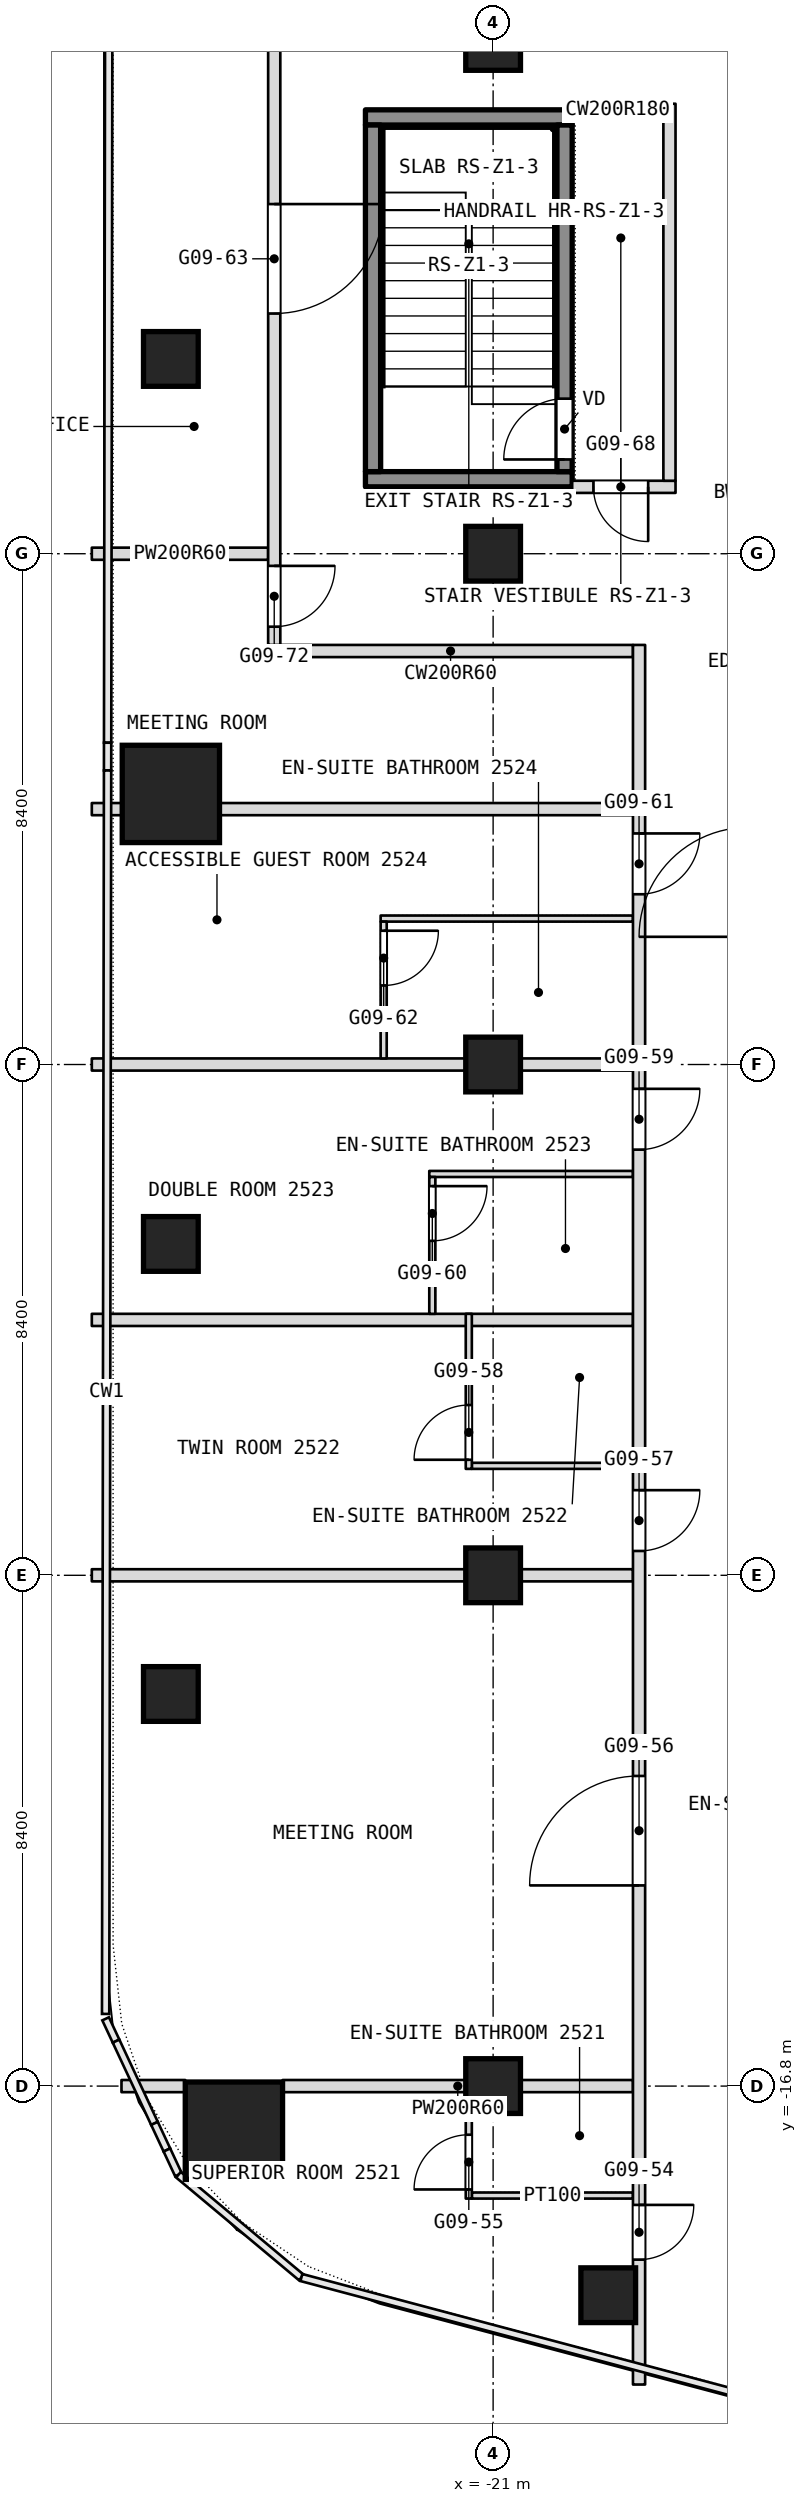
"""IFC4 building model, lengths in metres.
Left out: names, types, materials, properties, quantities, classifications, styles, units other than length and angle.
Written with IfcOpenShell. Run it as: python <this file> out.ifc"""

import sys

from ifc_helpers import new_model, si_unit, direction, frame, frame_2d, origin, origin_2d, place, context, subcontext, project, spatial, rectangle, extrude, element, fill, save


model = new_model("IFC4")
c1 = context("Model", 3, precision=1e-05, world=origin(), true_north=direction((0.0, 1.0)))
c2 = subcontext(c1, "Body", "Model", "MODEL_VIEW")
j1 = project(units=[si_unit("LENGTHUNIT", "METRE"), si_unit("PLANEANGLEUNIT", "RADIAN")], contexts=[c1])
p1 = place(None, origin())
s1 = spatial("IfcSite", under=j1, at=p1, CompositionType="ELEMENT")
p2 = place(p1, origin())
s2 = spatial("IfcBuilding", under=s1, at=p2, CompositionType="ELEMENT")
p3 = place(p2, frame((0.0, 0.0, 115.7)))
s3 = spatial("IfcBuildingStorey", under=s2, at=p3, CompositionType="ELEMENT", Elevation=115.7)
for number, where, z_axis, x_axis in (
    (1, (-25.263, -17.533, 0.0), (0.0, 0.0, 1.0), (1.0, 0.0, 0.0)),
    (2, (-26.3, 4.45, 0.0), (0.0, 0.0, 1.0), (1.0, 0.0, 0.0)),
):
    element("IfcColumn", number, at=place(p3, frame(where, z_axis=z_axis, x_axis=x_axis)), inside=s3, PredefinedType="COLUMN", context=c2, shape_type="SweptSolid", body=[
        extrude(rectangle(XDim=1.6, YDim=1.6, at=origin_2d()), origin(), (0.0, 0.0, 1.0), 3.6),
    ])
for number, where, z_axis, x_axis in (
    (3, (-21.0, -16.8, 0.0), (0.0, 0.0, 1.0), (1.0, 0.0, 0.0)),
    (4, (-21.0, -8.4, 0.0), (0.0, 0.0, 1.0), (1.0, 0.0, 0.0)),
    (5, (-21.0, 0.0, 0.0), (0.0, 0.0, 1.0), (1.0, 0.0, 0.0)),
    (6, (-21.0, 8.4, 0.0), (0.0, 0.0, 1.0), (1.0, 0.0, 0.0)),
    (7, (-21.0, 16.8, 0.0), (0.0, 0.0, 1.0), (1.0, 0.0, 0.0)),
    (8, (-26.3, -10.352, 0.0), (0.0, 0.0, 1.0), (1.0, 0.0, 0.0)),
    (9, (-26.3, -2.951, 0.0), (0.0, 0.0, 1.0), (1.0, 0.0, 0.0)),
    (10, (-26.3, 11.603, 0.0), (0.0, 0.0, 1.0), (1.0, 0.0, 0.0)),
    (11, (-19.107, -20.239, 0.0), (0.0, 0.0, 1.0), (1.0, 0.0, 0.0)),
):
    element("IfcColumn", number, at=place(p3, frame(where, z_axis=z_axis, x_axis=x_axis)), inside=s3, PredefinedType="COLUMN", context=c2, shape_type="SweptSolid", body=[
        extrude(rectangle(XDim=0.9, YDim=0.9, at=origin_2d()), origin(), (0.0, 0.0, 1.0), 3.6),
    ])
p4 = place(p3, frame((-21.35, -18.6, 0.0), z_axis=(0.0, 0.0, 1.0), x_axis=(1.0, 0.0, 0.0)))
e12 = element("IfcWall", 12, at=p4, inside=s3, PredefinedType="PARTITIONING", context=c2, shape_type="SweptSolid", body=[
    extrude(rectangle(XDim=2.65, YDim=0.1, at=frame_2d((1.325, 0.0))), origin(), (0.0, 0.0, 1.0), 3.34),
])
p5 = place(p3, frame((-27.112, -16.8, 0.0), z_axis=(0.0, 0.0, 1.0), x_axis=(1.0, 0.0, 0.0)))
e13 = element("IfcWall", 13, at=p5, inside=s3, PredefinedType="PARTITIONING", context=c2, shape_type="SweptSolid", body=[
    extrude(rectangle(XDim=1.049, YDim=0.2, at=frame_2d((0.524, 0.0))), origin(), (0.0, 0.0, 1.0), 3.34),
])
p6 = place(p3, frame((-24.463, -16.8, 0.0), z_axis=(0.0, 0.0, 1.0), x_axis=(1.0, 0.0, 0.0)))
e14 = element("IfcWall", 14, at=p6, inside=s3, PredefinedType="PARTITIONING", context=c2, shape_type="SweptSolid", body=[
    extrude(rectangle(XDim=5.763, YDim=0.2, at=frame_2d((2.881, 0.0))), origin(), (0.0, 0.0, 1.0), 2.89),
])
p7 = place(p3, frame((-27.6, -8.4, 0.0), z_axis=(0.0, 0.0, 1.0), x_axis=(1.0, 0.0, 0.0)))
e15 = element("IfcWall", 15, at=p7, inside=s3, PredefinedType="PARTITIONING", context=c2, shape_type="SweptSolid", body=[
    extrude(rectangle(XDim=8.9, YDim=0.2, at=frame_2d((4.45, 0.0))), origin(), (0.0, 0.0, 1.0), 2.89),
])
p8 = place(p3, frame((-21.35, -6.6, 0.0), z_axis=(0.0, 0.0, 1.0), x_axis=(1.0, 0.0, 0.0)))
e16 = element("IfcWall", 16, at=p8, inside=s3, PredefinedType="PARTITIONING", context=c2, shape_type="SweptSolid", body=[
    extrude(rectangle(XDim=2.65, YDim=0.1, at=frame_2d((1.325, 0.0))), origin(), (0.0, 0.0, 1.0), 3.34),
])
p9 = place(p3, frame((-27.6, -4.2, 0.0), z_axis=(0.0, 0.0, 1.0), x_axis=(1.0, 0.0, 0.0)))
e17 = element("IfcWall", 17, at=p9, inside=s3, PredefinedType="PARTITIONING", context=c2, shape_type="SweptSolid", body=[
    extrude(rectangle(XDim=8.9, YDim=0.2, at=frame_2d((4.45, 0.0))), origin(), (0.0, 0.0, 1.0), 3.34),
])
p10 = place(p3, frame((-22.05, -1.8, 0.0), z_axis=(0.0, 0.0, 1.0), x_axis=(1.0, 0.0, 0.0)))
e18 = element("IfcWall", 18, at=p10, inside=s3, PredefinedType="PARTITIONING", context=c2, shape_type="SweptSolid", body=[
    extrude(rectangle(XDim=3.35, YDim=0.1, at=frame_2d((1.675, 0.0))), origin(), (0.0, 0.0, 1.0), 3.34),
])
p11 = place(p3, frame((-27.6, 0.0, 0.0), z_axis=(0.0, 0.0, 1.0), x_axis=(1.0, 0.0, 0.0)))
e19 = element("IfcWall", 19, at=p11, inside=s3, PredefinedType="PARTITIONING", context=c2, shape_type="SweptSolid", body=[
    extrude(rectangle(XDim=8.9, YDim=0.2, at=frame_2d((4.45, 0.0))), origin(), (0.0, 0.0, 1.0), 2.89),
])
p12 = place(p3, frame((-22.85, 2.4, 0.0), z_axis=(0.0, 0.0, 1.0), x_axis=(1.0, 0.0, 0.0)))
e20 = element("IfcWall", 20, at=p12, inside=s3, PredefinedType="PARTITIONING", context=c2, shape_type="SweptSolid", body=[
    extrude(rectangle(XDim=4.15, YDim=0.1, at=frame_2d((2.075, 0.0))), origin(), (0.0, 0.0, 1.0), 3.34),
])
p13 = place(p3, frame((-27.6, 4.2, 0.0), z_axis=(0.0, 0.0, 1.0), x_axis=(1.0, 0.0, 0.0)))
e21 = element("IfcWall", 21, at=p13, inside=s3, PredefinedType="PARTITIONING", context=c2, shape_type="SweptSolid", body=[
    extrude(rectangle(XDim=0.5, YDim=0.2, at=frame_2d((0.25, 0.0))), origin(), (0.0, 0.0, 1.0), 3.34),
])
p14 = place(p3, frame((-25.5, 4.2, 0.0), z_axis=(0.0, 0.0, 1.0), x_axis=(1.0, 0.0, 0.0)))
e22 = element("IfcWall", 22, at=p14, inside=s3, PredefinedType="PARTITIONING", context=c2, shape_type="SweptSolid", body=[
    extrude(rectangle(XDim=6.8, YDim=0.2, at=frame_2d((3.4, 0.0))), origin(), (0.0, 0.0, 1.0), 3.34),
])
p15 = place(p3, frame((-24.7, 6.8, 0.0), z_axis=(0.0, 0.0, 1.0), x_axis=(1.0, 0.0, 0.0)))
e23 = element("IfcWall", 23, at=p15, inside=s3, PredefinedType="PARTITIONING", context=c2, shape_type="SweptSolid", body=[
    extrude(rectangle(XDim=6.0, YDim=0.2, at=frame_2d((3.0, 0.0))), origin(), (0.0, 0.0, 1.0), 3.34),
])
p16 = place(p3, frame((-27.6, 8.4, 0.0), z_axis=(0.0, 0.0, 1.0), x_axis=(1.0, 0.0, 0.0)))
e24 = element("IfcWall", 24, at=p16, inside=s3, PredefinedType="PARTITIONING", context=c2, shape_type="SweptSolid", body=[
    extrude(rectangle(XDim=2.9, YDim=0.2, at=frame_2d((1.45, 0.0))), origin(), (0.0, 0.0, 1.0), 2.89),
])
p17 = place(p3, frame((-19.7, 9.5, 0.0), z_axis=(0.0, 0.0, 1.0), x_axis=(1.0, 0.0, 0.0)))
e25 = element("IfcWall", 25, at=p17, inside=s3, PredefinedType="PARTITIONING", context=c2, shape_type="SweptSolid", body=[
    extrude(rectangle(XDim=1.7, YDim=0.2, at=frame_2d((0.85, 0.0))), origin(), (0.0, 0.0, 1.0), 3.34),
])
p18 = place(p17, frame((0.35, 0.0, 0.0)))
e26 = element("IfcOpeningElement", 26, at=p18, cuts=e25, PredefinedType="OPENING", context=c2, shape_type="SweptSolid", body=[
    extrude(rectangle(XDim=0.9, YDim=2.1, at=frame_2d((0.45, 1.05))), frame((0.0, 0.1, 0.0), z_axis=(0.0, -1.0, 0.0), x_axis=(1.0, 0.0, 0.0)), (0.0, 0.0, 1.0), 0.2),
])
p19 = place(p3, frame((-19.7, 15.7, 0.0), z_axis=(0.0, 0.0, 1.0), x_axis=(1.0, 0.0, 0.0)))
e27 = element("IfcWall", 27, at=p19, inside=s3, PredefinedType="PARTITIONING", context=c2, shape_type="SweptSolid", body=[
    extrude(rectangle(XDim=1.5, YDim=0.2, at=frame_2d((0.75, 0.0))), origin(), (0.0, 0.0, 1.0), 3.34),
])
p20 = place(p3, frame((-18.1, 9.6, 0.0), z_axis=(0.0, 0.0, 1.0), x_axis=(0.0, 1.0, 0.0)))
e28 = element("IfcWall", 28, at=p20, inside=s3, PredefinedType="PARTITIONING", context=c2, shape_type="SweptSolid", body=[
    extrude(rectangle(XDim=6.2, YDim=0.2, at=frame_2d((3.1, 0.0))), origin(), (0.0, 0.0, 1.0), 3.34),
])
p21 = place(p3, frame((-18.6, -21.708, 0.0), z_axis=(0.0, 0.0, 1.0), x_axis=(0.0, 1.0, 0.0)))
e29 = element("IfcWall", 29, at=p21, inside=s3, PredefinedType="PARTITIONING", context=c2, shape_type="SweptSolid", body=[
    extrude(rectangle(XDim=28.608, YDim=0.2, at=frame_2d((14.304, 0.0))), origin(), (0.0, 0.0, 1.0), 3.34),
])
p22 = place(p21, frame((2.054, 0.0, 0.0)))
e30 = element("IfcOpeningElement", 30, at=p22, cuts=e29, PredefinedType="OPENING", context=c2, shape_type="SweptSolid", body=[
    extrude(rectangle(XDim=0.9, YDim=2.1, at=frame_2d((0.45, 1.05))), frame((0.0, 0.1, 0.0), z_axis=(0.0, -1.0, 0.0), x_axis=(1.0, 0.0, 0.0)), (0.0, 0.0, 1.0), 0.2),
])
p23 = place(p21, frame((8.208, 0.0, 0.0)))
e31 = element("IfcOpeningElement", 31, at=p23, cuts=e29, PredefinedType="OPENING", context=c2, shape_type="SweptSolid", body=[
    extrude(rectangle(XDim=1.8, YDim=2.1, at=frame_2d((0.9, 1.05))), frame((0.0, 0.1, 0.0), z_axis=(0.0, -1.0, 0.0), x_axis=(1.0, 0.0, 0.0)), (0.0, 0.0, 1.0), 0.2),
])
p24 = place(p21, frame((13.708, 0.0, 0.0)))
e32 = element("IfcOpeningElement", 32, at=p24, cuts=e29, PredefinedType="OPENING", context=c2, shape_type="SweptSolid", body=[
    extrude(rectangle(XDim=1.0, YDim=2.1, at=frame_2d((0.5, 1.05))), frame((0.0, 0.1, 0.0), z_axis=(0.0, -1.0, 0.0), x_axis=(1.0, 0.0, 0.0)), (0.0, 0.0, 1.0), 0.2),
])
p25 = place(p21, frame((20.308, 0.0, 0.0)))
e33 = element("IfcOpeningElement", 33, at=p25, cuts=e29, PredefinedType="OPENING", context=c2, shape_type="SweptSolid", body=[
    extrude(rectangle(XDim=1.0, YDim=2.1, at=frame_2d((0.5, 1.05))), frame((0.0, 0.1, 0.0), z_axis=(0.0, -1.0, 0.0), x_axis=(1.0, 0.0, 0.0)), (0.0, 0.0, 1.0), 0.2),
])
p26 = place(p21, frame((24.508, 0.0, 0.0)))
e34 = element("IfcOpeningElement", 34, at=p26, cuts=e29, PredefinedType="OPENING", context=c2, shape_type="SweptSolid", body=[
    extrude(rectangle(XDim=1.0, YDim=2.1, at=frame_2d((0.5, 1.05))), frame((0.0, 0.1, 0.0), z_axis=(0.0, -1.0, 0.0), x_axis=(1.0, 0.0, 0.0)), (0.0, 0.0, 1.0), 0.2),
])
p27 = place(p3, frame((-21.4, -18.65, 0.0), z_axis=(0.0, 0.0, 1.0), x_axis=(0.0, 1.0, 0.0)))
e35 = element("IfcWall", 35, at=p27, inside=s3, PredefinedType="PARTITIONING", context=c2, shape_type="SweptSolid", body=[
    extrude(rectangle(XDim=1.95, YDim=0.1, at=frame_2d((0.975, 0.0))), origin(), (0.0, 0.0, 1.0), 3.34),
])
p28 = place(p27, frame((0.15, 0.0, 0.0)))
e36 = element("IfcOpeningElement", 36, at=p28, cuts=e35, PredefinedType="OPENING", context=c2, shape_type="SweptSolid", body=[
    extrude(rectangle(XDim=0.9, YDim=2.1, at=frame_2d((0.45, 1.05))), frame((0.0, 0.05, 0.0), z_axis=(0.0, -1.0, 0.0), x_axis=(1.0, 0.0, 0.0)), (0.0, 0.0, 1.0), 0.1),
])
p29 = place(p3, frame((-21.4, -6.65, 0.0), z_axis=(0.0, 0.0, 1.0), x_axis=(0.0, 1.0, 0.0)))
e37 = element("IfcWall", 37, at=p29, inside=s3, PredefinedType="PARTITIONING", context=c2, shape_type="SweptSolid", body=[
    extrude(rectangle(XDim=2.55, YDim=0.1, at=frame_2d((1.275, 0.0))), origin(), (0.0, 0.0, 1.0), 3.34),
])
p30 = place(p29, frame((0.15, 0.0, 0.0)))
e38 = element("IfcOpeningElement", 38, at=p30, cuts=e37, PredefinedType="OPENING", context=c2, shape_type="SweptSolid", body=[
    extrude(rectangle(XDim=0.9, YDim=2.1, at=frame_2d((0.45, 1.05))), frame((0.0, 0.05, 0.0), z_axis=(0.0, -1.0, 0.0), x_axis=(1.0, 0.0, 0.0)), (0.0, 0.0, 1.0), 0.1),
])
p31 = place(p3, frame((-22.0, -4.1, 0.0), z_axis=(0.0, 0.0, 1.0), x_axis=(0.0, 1.0, 0.0)))
e39 = element("IfcWall", 39, at=p31, inside=s3, PredefinedType="PARTITIONING", context=c2, shape_type="SweptSolid", body=[
    extrude(rectangle(XDim=2.25, YDim=0.1, at=frame_2d((1.125, 0.0))), origin(), (0.0, 0.0, 1.0), 3.34),
])
p32 = place(p31, frame((1.2, 0.0, 0.0)))
e40 = element("IfcOpeningElement", 40, at=p32, cuts=e39, PredefinedType="OPENING", context=c2, shape_type="SweptSolid", body=[
    extrude(rectangle(XDim=0.9, YDim=2.1, at=frame_2d((0.45, 1.05))), frame((0.0, 0.05, 0.0), z_axis=(0.0, -1.0, 0.0), x_axis=(1.0, 0.0, 0.0)), (0.0, 0.0, 1.0), 0.1),
])
p33 = place(p3, frame((-22.8, 0.1, 0.0), z_axis=(0.0, 0.0, 1.0), x_axis=(0.0, 1.0, 0.0)))
e41 = element("IfcWall", 41, at=p33, inside=s3, PredefinedType="PARTITIONING", context=c2, shape_type="SweptSolid", body=[
    extrude(rectangle(XDim=2.25, YDim=0.1, at=frame_2d((1.125, 0.0))), origin(), (0.0, 0.0, 1.0), 3.34),
])
p34 = place(p33, frame((1.2, 0.0, 0.0)))
e42 = element("IfcOpeningElement", 42, at=p34, cuts=e41, PredefinedType="OPENING", context=c2, shape_type="SweptSolid", body=[
    extrude(rectangle(XDim=0.9, YDim=2.1, at=frame_2d((0.45, 1.05))), frame((0.0, 0.05, 0.0), z_axis=(0.0, -1.0, 0.0), x_axis=(1.0, 0.0, 0.0)), (0.0, 0.0, 1.0), 0.1),
])
p35 = place(p3, frame((-24.6, 6.9, 0.0), z_axis=(0.0, 0.0, 1.0), x_axis=(0.0, 1.0, 0.0)))
e43 = element("IfcWall", 43, at=p35, inside=s3, PredefinedType="PARTITIONING", context=c2, shape_type="SweptSolid", body=[
    extrude(rectangle(XDim=11.6, YDim=0.2, at=frame_2d((5.8, 0.0))), origin(), (0.0, 0.0, 1.0), 3.34),
])
p36 = place(p35, frame((5.45, 0.0, 0.0)))
e44 = element("IfcOpeningElement", 44, at=p36, cuts=e43, PredefinedType="OPENING", context=c2, shape_type="SweptSolid", body=[
    extrude(rectangle(XDim=1.8, YDim=2.1, at=frame_2d((0.9, 1.05))), frame((0.0, 0.1, 0.0), z_axis=(0.0, -1.0, 0.0), x_axis=(1.0, 0.0, 0.0)), (0.0, 0.0, 1.0), 0.2),
])
p37 = place(p35, frame((0.3, 0.0, 0.0)))
e45 = element("IfcOpeningElement", 45, at=p37, cuts=e43, PredefinedType="OPENING", context=c2, shape_type="SweptSolid", body=[
    extrude(rectangle(XDim=1.0, YDim=2.1, at=frame_2d((0.5, 1.05))), frame((0.0, 0.1, 0.0), z_axis=(0.0, -1.0, 0.0), x_axis=(1.0, 0.0, 0.0)), (0.0, 0.0, 1.0), 0.2),
])
for number, where, z_axis, x_axis in (
    (46, (-23.1, 9.625, 0.1), (0.0, 0.0, 1.0), (1.0, 0.0, 0.0)),
    (47, (-23.1, 15.575, 0.1), (0.0, 0.0, 1.0), (1.0, 0.0, 0.0)),
):
    element("IfcWall", number, at=place(p3, frame(where, z_axis=z_axis, x_axis=x_axis)), inside=s3, PredefinedType="SHEAR", context=c2, shape_type="SweptSolid", body=[
        extrude(rectangle(XDim=3.4, YDim=0.25, at=frame_2d((1.7, 0.0))), origin(), (0.0, 0.0, 1.0), 3.6),
    ])
p38 = place(p3, frame((-22.975, 9.75, 0.1), z_axis=(0.0, 0.0, 1.0), x_axis=(0.0, 1.0, 0.0)))
e48 = element("IfcWall", 48, at=p38, inside=s3, PredefinedType="SHEAR", context=c2, shape_type="SweptSolid", body=[
    extrude(rectangle(XDim=5.7, YDim=0.25, at=frame_2d((2.85, 0.0))), origin(), (0.0, 0.0, 1.0), 3.6),
])
p39 = place(p3, frame((-19.825, 9.75, 0.1), z_axis=(0.0, 0.0, 1.0), x_axis=(0.0, 1.0, 0.0)))
e49 = element("IfcWall", 49, at=p39, inside=s3, PredefinedType="SHEAR", context=c2, shape_type="SweptSolid", body=[
    extrude(rectangle(XDim=5.7, YDim=0.25, at=frame_2d((2.85, 0.0))), origin(), (0.0, 0.0, 1.0), 3.6),
])
p40 = place(p39, frame((0.2, 0.0, 0.0)))
e50 = element("IfcOpeningElement", 50, at=p40, cuts=e49, PredefinedType="OPENING", context=c2, shape_type="SweptSolid", body=[
    extrude(rectangle(XDim=1.0, YDim=2.1, at=frame_2d((0.5, 1.05))), frame((0.0, 0.125, 0.0), z_axis=(0.0, -1.0, 0.0), x_axis=(1.0, 0.0, 0.0)), (0.0, 0.0, 1.0), 0.25),
])
p41 = place(p18, origin())
e51 = element("IfcDoor", 51, at=p41, inside=s3, OperationType="SINGLE_SWING_RIGHT", PredefinedType="DOOR", context=c2, shape_type="SweptSolid", body=[
    extrude(rectangle(XDim=0.9, YDim=2.1, at=frame_2d((0.45, 1.05))), frame((0.0, 0.025, 0.0), z_axis=(0.0, -1.0, 0.0), x_axis=(1.0, 0.0, 0.0)), (0.0, 0.0, 1.0), 0.05),
])
fill(e26, e51)
p42 = place(p22, origin())
e52 = element("IfcDoor", 52, at=p42, inside=s3, OperationType="SINGLE_SWING_LEFT", PredefinedType="DOOR", context=c2, shape_type="SweptSolid", body=[
    extrude(rectangle(XDim=0.9, YDim=2.1, at=frame_2d((0.45, 1.05))), frame((0.0, 0.025, 0.0), z_axis=(0.0, -1.0, 0.0), x_axis=(1.0, 0.0, 0.0)), (0.0, 0.0, 1.0), 0.05),
])
fill(e30, e52)
p43 = place(p23, origin())
e53 = element("IfcDoor", 53, at=p43, inside=s3, OperationType="DOUBLE_DOOR_SINGLE_SWING", PredefinedType="DOOR", context=c2, shape_type="SweptSolid", body=[
    extrude(rectangle(XDim=1.8, YDim=2.1, at=frame_2d((0.9, 1.05))), frame((0.0, 0.025, 0.0), z_axis=(0.0, -1.0, 0.0), x_axis=(1.0, 0.0, 0.0)), (0.0, 0.0, 1.0), 0.05),
])
fill(e31, e53)
p44 = place(p24, origin())
e54 = element("IfcDoor", 54, at=p44, inside=s3, OperationType="SINGLE_SWING_RIGHT", PredefinedType="DOOR", context=c2, shape_type="SweptSolid", body=[
    extrude(rectangle(XDim=1.0, YDim=2.1, at=frame_2d((0.5, 1.05))), frame((0.0, 0.025, 0.0), z_axis=(0.0, -1.0, 0.0), x_axis=(1.0, 0.0, 0.0)), (0.0, 0.0, 1.0), 0.05),
])
fill(e32, e54)
p45 = place(p25, origin())
e55 = element("IfcDoor", 55, at=p45, inside=s3, OperationType="SINGLE_SWING_RIGHT", PredefinedType="DOOR", context=c2, shape_type="SweptSolid", body=[
    extrude(rectangle(XDim=1.0, YDim=2.1, at=frame_2d((0.5, 1.05))), frame((0.0, 0.025, 0.0), z_axis=(0.0, -1.0, 0.0), x_axis=(1.0, 0.0, 0.0)), (0.0, 0.0, 1.0), 0.05),
])
fill(e33, e55)
p46 = place(p26, origin())
e56 = element("IfcDoor", 56, at=p46, inside=s3, OperationType="SINGLE_SWING_RIGHT", PredefinedType="DOOR", context=c2, shape_type="SweptSolid", body=[
    extrude(rectangle(XDim=1.0, YDim=2.1, at=frame_2d((0.5, 1.05))), frame((0.0, 0.025, 0.0), z_axis=(0.0, -1.0, 0.0), x_axis=(1.0, 0.0, 0.0)), (0.0, 0.0, 1.0), 0.05),
])
fill(e34, e56)
p47 = place(p28, origin())
e57 = element("IfcDoor", 57, at=p47, inside=s3, OperationType="SINGLE_SWING_RIGHT", PredefinedType="DOOR", context=c2, shape_type="SweptSolid", body=[
    extrude(rectangle(XDim=0.9, YDim=2.1, at=frame_2d((0.45, 1.05))), frame((0.0, 0.025, 0.0), z_axis=(0.0, -1.0, 0.0), x_axis=(1.0, 0.0, 0.0)), (0.0, 0.0, 1.0), 0.05),
])
fill(e36, e57)
p48 = place(p30, origin())
e58 = element("IfcDoor", 58, at=p48, inside=s3, OperationType="SINGLE_SWING_RIGHT", PredefinedType="DOOR", context=c2, shape_type="SweptSolid", body=[
    extrude(rectangle(XDim=0.9, YDim=2.1, at=frame_2d((0.45, 1.05))), frame((0.0, 0.025, 0.0), z_axis=(0.0, -1.0, 0.0), x_axis=(1.0, 0.0, 0.0)), (0.0, 0.0, 1.0), 0.05),
])
fill(e38, e58)
p49 = place(p32, origin())
e59 = element("IfcDoor", 59, at=p49, inside=s3, OperationType="SINGLE_SWING_LEFT", PredefinedType="DOOR", context=c2, shape_type="SweptSolid", body=[
    extrude(rectangle(XDim=0.9, YDim=2.1, at=frame_2d((0.45, 1.05))), frame((0.0, 0.025, 0.0), z_axis=(0.0, -1.0, 0.0), x_axis=(1.0, 0.0, 0.0)), (0.0, 0.0, 1.0), 0.05),
])
fill(e40, e59)
p50 = place(p34, origin())
e60 = element("IfcDoor", 60, at=p50, inside=s3, OperationType="SINGLE_SWING_LEFT", PredefinedType="DOOR", context=c2, shape_type="SweptSolid", body=[
    extrude(rectangle(XDim=0.9, YDim=2.1, at=frame_2d((0.45, 1.05))), frame((0.0, 0.025, 0.0), z_axis=(0.0, -1.0, 0.0), x_axis=(1.0, 0.0, 0.0)), (0.0, 0.0, 1.0), 0.05),
])
fill(e42, e60)
p51 = place(p36, origin())
e61 = element("IfcDoor", 61, at=p51, inside=s3, OperationType="DOUBLE_DOOR_SINGLE_SWING", PredefinedType="DOOR", context=c2, shape_type="SweptSolid", body=[
    extrude(rectangle(XDim=1.8, YDim=2.1, at=frame_2d((0.9, 1.05))), frame((0.0, 0.025, 0.0), z_axis=(0.0, -1.0, 0.0), x_axis=(1.0, 0.0, 0.0)), (0.0, 0.0, 1.0), 0.05),
])
fill(e44, e61)
p52 = place(p37, origin())
e62 = element("IfcDoor", 62, at=p52, inside=s3, OperationType="SINGLE_SWING_LEFT", PredefinedType="DOOR", context=c2, shape_type="SweptSolid", body=[
    extrude(rectangle(XDim=1.0, YDim=2.1, at=frame_2d((0.5, 1.05))), frame((0.0, 0.025, 0.0), z_axis=(0.0, -1.0, 0.0), x_axis=(1.0, 0.0, 0.0)), (0.0, 0.0, 1.0), 0.05),
])
fill(e45, e62)
p53 = place(p40, origin())
e63 = element("IfcDoor", 63, at=p53, inside=s3, OperationType="SINGLE_SWING_LEFT", PredefinedType="DOOR", context=c2, shape_type="SweptSolid", body=[
    extrude(rectangle(XDim=1.0, YDim=2.1, at=frame_2d((0.5, 1.05))), frame((0.0, 0.025, 0.0), z_axis=(0.0, -1.0, 0.0), x_axis=(1.0, 0.0, 0.0)), (0.0, 0.0, 1.0), 0.05),
])
fill(e50, e63)
save(model, sys.argv[1])
